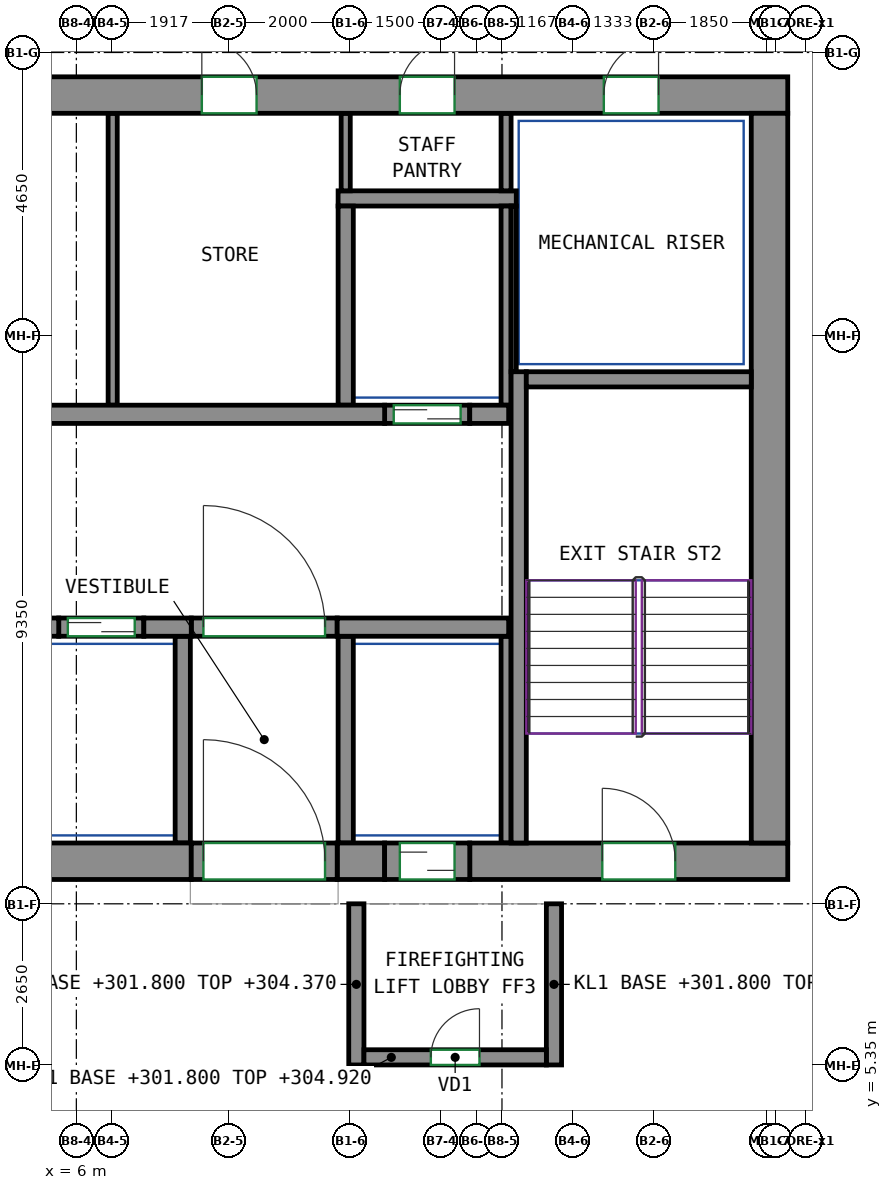
"""IFC4 building model, lengths in metres.
Left out: names, types, materials, properties, quantities, classifications, styles, units other than length and angle.
Written with IfcOpenShell. Run it as: python <this file> out.ifc"""

import sys

from ifc_helpers import new_model, si_unit, direction, frame, frame_2d, origin, place, context, subcontext, project, spatial, rectangle, extrude, source, transform, mapped, element, fill, save


model = new_model("IFC4")
c1 = context("Model", 3, precision=1e-05, world=origin(), true_north=direction((0.0, 1.0)))
c2 = subcontext(c1, "Body", "Model", "MODEL_VIEW")
j1 = project(units=[si_unit("LENGTHUNIT", "METRE"), si_unit("PLANEANGLEUNIT", "RADIAN")], contexts=[c1])
p1 = place(None, origin())
s1 = spatial("IfcSite", under=j1, at=p1, CompositionType="ELEMENT")
p2 = place(p1, origin())
s2 = spatial("IfcBuilding", under=s1, at=p2, CompositionType="ELEMENT")
p3 = place(p2, frame((0.0, 0.0, 301.8)))
s3 = spatial("IfcBuildingStorey", under=s2, at=p3, CompositionType="ELEMENT", Elevation=301.8)
m1 = source(origin(), c2, "Body", "SweptSolid", [
    extrude(rectangle(XDim=14.18, YDim=0.6, at=frame_2d((7.09, 0.0))), origin(), (0.0, 0.0, 1.0), 3.12),
])
p4 = place(p3, frame((-6.29, 8.7, 0.0), z_axis=(0.0, 0.0, 1.0), x_axis=(1.0, 0.0, 0.0)))
e1 = element("IfcWall", 1, at=p4, inside=s3, PredefinedType="SHEAR", context=c2, shape_type="MappedRepresentation", body=[
    mapped(m1, transform((0.0, 0.0, 0.0))),
])
m2 = source(origin(), c2, "Body", "SweptSolid", [
    extrude(rectangle(XDim=0.78, YDim=0.6, at=frame_2d((0.39, 0.0))), origin(), (0.0, 0.0, 1.0), 3.12),
])
p5 = place(p3, frame((10.29, 8.7, 0.0), z_axis=(0.0, 0.0, 1.0), x_axis=(1.0, 0.0, 0.0)))
e2 = element("IfcWall", 2, at=p5, inside=s3, PredefinedType="SHEAR", context=c2, shape_type="MappedRepresentation", body=[
    mapped(m2, transform((0.0, 0.0, 0.0))),
])
m3 = source(origin(), c2, "Body", "SweptSolid", [
    extrude(rectangle(XDim=5.23, YDim=0.6, at=frame_2d((2.615, 0.0))), origin(), (0.0, 0.0, 1.0), 3.12),
])
p6 = place(p3, frame((12.47, 8.7, 0.0), z_axis=(0.0, 0.0, 1.0), x_axis=(1.0, 0.0, 0.0)))
e3 = element("IfcWall", 3, at=p6, inside=s3, PredefinedType="SHEAR", context=c2, shape_type="MappedRepresentation", body=[
    mapped(m3, transform((0.0, 0.0, 0.0))),
])
p7 = place(p6, frame((2.18, 0.0, 0.0)))
e4 = element("IfcOpeningElement", 4, at=p7, cuts=e3, PredefinedType="OPENING", context=c2, shape_type="SweptSolid", body=[
    extrude(rectangle(XDim=1.2, YDim=2.1, at=frame_2d((0.6, 1.05))), frame((0.0, 0.31, 0.0), z_axis=(0.0, -1.0, 0.0), x_axis=(1.0, 0.0, 0.0)), (0.0, 0.0, 1.0), 0.62),
])
m4 = source(origin(), c2, "Body", "SweptSolid", [
    extrude(rectangle(XDim=33.3, YDim=0.6, at=frame_2d((16.65, 0.0))), origin(), (0.0, 0.0, 1.0), 3.12),
])
p8 = place(p3, frame((-15.6, 21.3, 0.0), z_axis=(0.0, 0.0, 1.0), x_axis=(1.0, 0.0, 0.0)))
e5 = element("IfcWall", 5, at=p8, inside=s3, PredefinedType="SHEAR", context=c2, shape_type="MappedRepresentation", body=[
    mapped(m4, transform((0.0, 0.0, 0.0))),
])
p9 = place(p8, frame((8.12, 0.0, 0.0)))
e6 = element("IfcOpeningElement", 6, at=p9, cuts=e5, PredefinedType="OPENING", context=c2, shape_type="SweptSolid", body=[
    extrude(rectangle(XDim=0.9, YDim=2.1, at=frame_2d((0.45, 1.05))), frame((0.0, 0.31, 0.0), z_axis=(0.0, -1.0, 0.0), x_axis=(1.0, 0.0, 0.0)), (0.0, 0.0, 1.0), 0.62),
])
p10 = place(p8, frame((14.15, 0.0, 0.0)))
e7 = element("IfcOpeningElement", 7, at=p10, cuts=e5, PredefinedType="OPENING", context=c2, shape_type="SweptSolid", body=[
    extrude(rectangle(XDim=0.9, YDim=2.1, at=frame_2d((0.45, 1.05))), frame((0.0, 0.31, 0.0), z_axis=(0.0, -1.0, 0.0), x_axis=(1.0, 0.0, 0.0)), (0.0, 0.0, 1.0), 0.62),
])
p11 = place(p8, frame((18.974, 0.0, 0.0)))
e8 = element("IfcOpeningElement", 8, at=p11, cuts=e5, PredefinedType="OPENING", context=c2, shape_type="SweptSolid", body=[
    extrude(rectangle(XDim=0.9, YDim=2.1, at=frame_2d((0.45, 1.05))), frame((0.0, 0.31, 0.0), z_axis=(0.0, -1.0, 0.0), x_axis=(1.0, 0.0, 0.0)), (0.0, 0.0, 1.0), 0.62),
])
p12 = place(p8, frame((23.664, 0.0, 0.0)))
e9 = element("IfcOpeningElement", 9, at=p12, cuts=e5, PredefinedType="OPENING", context=c2, shape_type="SweptSolid", body=[
    extrude(rectangle(XDim=0.9, YDim=2.1, at=frame_2d((0.45, 1.05))), frame((0.0, 0.31, 0.0), z_axis=(0.0, -1.0, 0.0), x_axis=(1.0, 0.0, 0.0)), (0.0, 0.0, 1.0), 0.62),
])
p13 = place(p8, frame((26.92, 0.0, 0.0)))
e10 = element("IfcOpeningElement", 10, at=p13, cuts=e5, PredefinedType="OPENING", context=c2, shape_type="SweptSolid", body=[
    extrude(rectangle(XDim=0.9, YDim=2.1, at=frame_2d((0.45, 1.05))), frame((0.0, 0.31, 0.0), z_axis=(0.0, -1.0, 0.0), x_axis=(1.0, 0.0, 0.0)), (0.0, 0.0, 1.0), 0.62),
])
p14 = place(p8, frame((2.125, 0.0, 0.0)))
e11 = element("IfcOpeningElement", 11, at=p14, cuts=e5, PredefinedType="OPENING", context=c2, shape_type="SweptSolid", body=[
    extrude(rectangle(XDim=0.9, YDim=2.1, at=frame_2d((0.45, 1.05))), frame((0.0, 0.31, 0.0), z_axis=(0.0, -1.0, 0.0), x_axis=(1.0, 0.0, 0.0)), (0.0, 0.0, 1.0), 0.62),
])
p15 = place(p8, frame((30.275, 0.0, 0.0)))
e12 = element("IfcOpeningElement", 12, at=p15, cuts=e5, PredefinedType="OPENING", context=c2, shape_type="SweptSolid", body=[
    extrude(rectangle(XDim=0.9, YDim=2.1, at=frame_2d((0.45, 1.05))), frame((0.0, 0.31, 0.0), z_axis=(0.0, -1.0, 0.0), x_axis=(1.0, 0.0, 0.0)), (0.0, 0.0, 1.0), 0.62),
])
m5 = source(origin(), c2, "Body", "SweptSolid", [
    extrude(rectangle(XDim=12.0, YDim=0.6, at=frame_2d((6.0, 0.0))), origin(), (0.0, 0.0, 1.0), 3.12),
])
p16 = place(p3, frame((17.4, 9.0, 0.0), z_axis=(0.0, 0.0, 1.0), x_axis=(0.0, 1.0, 0.0)))
e13 = element("IfcWall", 13, at=p16, inside=s3, PredefinedType="SHEAR", context=c2, shape_type="MappedRepresentation", body=[
    mapped(m5, transform((0.0, 0.0, 0.0))),
])
m6 = source(origin(), c2, "Body", "SweptSolid", [
    extrude(rectangle(XDim=7.75, YDim=0.25, at=frame_2d((3.875, 0.0))), origin(), (0.0, 0.0, 1.0), 3.12),
])
p17 = place(p3, frame((13.275, 9.0, 0.0), z_axis=(0.0, 0.0, 1.0), x_axis=(0.0, 1.0, 0.0)))
e14 = element("IfcWall", 14, at=p17, inside=s3, PredefinedType="SHEAR", context=c2, shape_type="MappedRepresentation", body=[
    mapped(m6, transform((0.0, 0.0, 0.0))),
])
m7 = source(origin(), c2, "Body", "SweptSolid", [
    extrude(rectangle(XDim=3.7, YDim=0.25, at=frame_2d((1.85, 0.0))), origin(), (0.0, 0.0, 1.0), 3.12),
])
p18 = place(p3, frame((13.4, 16.625, 0.0), z_axis=(0.0, 0.0, 1.0), x_axis=(1.0, 0.0, 0.0)))
e15 = element("IfcWall", 15, at=p18, inside=s3, PredefinedType="SHEAR", context=c2, shape_type="MappedRepresentation", body=[
    mapped(m7, transform((0.0, 0.0, 0.0))),
])
m8 = source(origin(), c2, "Body", "SweptSolid", [
    extrude(rectangle(XDim=1.28, YDim=0.3, at=frame_2d((0.64, 0.0))), origin(), (0.0, 0.0, 1.0), 3.12),
])
p19 = place(p3, frame((4.43, 12.55, 0.0), z_axis=(0.0, 0.0, 1.0), x_axis=(1.0, 0.0, 0.0)))
e16 = element("IfcWall", 16, at=p19, inside=s3, PredefinedType="SHEAR", context=c2, shape_type="MappedRepresentation", body=[
    mapped(m8, transform((0.0, 0.0, 0.0))),
])
m9 = source(origin(), c2, "Body", "SweptSolid", [
    extrude(rectangle(XDim=0.78, YDim=0.3, at=frame_2d((0.39, 0.0))), origin(), (0.0, 0.0, 1.0), 3.12),
])
p20 = place(p3, frame((7.11, 12.55, 0.0), z_axis=(0.0, 0.0, 1.0), x_axis=(1.0, 0.0, 0.0)))
e17 = element("IfcWall", 17, at=p20, inside=s3, PredefinedType="SHEAR", context=c2, shape_type="MappedRepresentation", body=[
    mapped(m9, transform((0.0, 0.0, 0.0))),
])
m10 = source(origin(), c2, "Body", "SweptSolid", [
    extrude(rectangle(XDim=2.82, YDim=0.3, at=frame_2d((1.41, 0.0))), origin(), (0.0, 0.0, 1.0), 3.12),
])
p21 = place(p3, frame((10.29, 12.55, 0.0), z_axis=(0.0, 0.0, 1.0), x_axis=(1.0, 0.0, 0.0)))
e18 = element("IfcWall", 18, at=p21, inside=s3, PredefinedType="SHEAR", context=c2, shape_type="MappedRepresentation", body=[
    mapped(m10, transform((0.0, 0.0, 0.0))),
])
m11 = source(origin(), c2, "Body", "SweptSolid", [
    extrude(rectangle(XDim=22.08, YDim=0.3, at=frame_2d((11.04, 0.0))), origin(), (0.0, 0.0, 1.0), 3.12),
])
p22 = place(p3, frame((-11.01, 16.05, 0.0), z_axis=(0.0, 0.0, 1.0), x_axis=(1.0, 0.0, 0.0)))
e19 = element("IfcWall", 19, at=p22, inside=s3, PredefinedType="SHEAR", context=c2, shape_type="MappedRepresentation", body=[
    mapped(m11, transform((0.0, 0.0, 0.0))),
])
m12 = source(origin(), c2, "Body", "SweptSolid", [
    extrude(rectangle(XDim=0.64, YDim=0.3, at=frame_2d((0.32, 0.0))), origin(), (0.0, 0.0, 1.0), 3.12),
])
p23 = place(p3, frame((12.47, 16.05, 0.0), z_axis=(0.0, 0.0, 1.0), x_axis=(1.0, 0.0, 0.0)))
e20 = element("IfcWall", 20, at=p23, inside=s3, PredefinedType="SHEAR", context=c2, shape_type="MappedRepresentation", body=[
    mapped(m12, transform((0.0, 0.0, 0.0))),
])
m13 = source(origin(), c2, "Body", "SweptSolid", [
    extrude(rectangle(XDim=1.4, YDim=0.3, at=frame_2d((0.7, 0.0))), origin(), (0.0, 0.0, 1.0), 3.12),
])
p24 = place(p3, frame((5.71, 12.55, 0.0), z_axis=(0.0, 0.0, 1.0), x_axis=(1.0, 0.0, 0.0)))
e21 = element("IfcWall", 21, at=p24, inside=s3, PredefinedType="PARTITIONING", context=c2, shape_type="MappedRepresentation", body=[
    mapped(m13, transform((0.0, 0.0, 0.0))),
])
p25 = place(p24, frame((0.15, 0.0, 0.0)))
e22 = element("IfcOpeningElement", 22, at=p25, cuts=e21, PredefinedType="OPENING", context=c2, shape_type="SweptSolid", body=[
    extrude(rectangle(XDim=1.1, YDim=2.1, at=frame_2d((0.55, 1.05))), frame((0.0, 0.16, 0.0), z_axis=(0.0, -1.0, 0.0), x_axis=(1.0, 0.0, 0.0)), (0.0, 0.0, 1.0), 0.32),
])
m14 = source(origin(), c2, "Body", "SweptSolid", [
    extrude(rectangle(XDim=1.4, YDim=0.3, at=frame_2d((0.7, 0.0))), origin(), (0.0, 0.0, 1.0), 3.12),
])
p26 = place(p3, frame((11.07, 16.05, 0.0), z_axis=(0.0, 0.0, 1.0), x_axis=(1.0, 0.0, 0.0)))
e23 = element("IfcWall", 23, at=p26, inside=s3, PredefinedType="PARTITIONING", context=c2, shape_type="MappedRepresentation", body=[
    mapped(m14, transform((0.0, 0.0, 0.0))),
])
p27 = place(p26, frame((0.15, 0.0, 0.0)))
e24 = element("IfcOpeningElement", 24, at=p27, cuts=e23, PredefinedType="OPENING", context=c2, shape_type="SweptSolid", body=[
    extrude(rectangle(XDim=1.1, YDim=2.1, at=frame_2d((0.55, 1.05))), frame((0.0, 0.16, 0.0), z_axis=(0.0, -1.0, 0.0), x_axis=(1.0, 0.0, 0.0)), (0.0, 0.0, 1.0), 0.32),
])
m15 = source(origin(), c2, "Body", "SweptSolid", [
    extrude(rectangle(XDim=2.4, YDim=0.3, at=frame_2d((1.2, 0.0))), origin(), (0.0, 0.0, 1.0), 3.12),
])
p28 = place(p3, frame((7.89, 12.55, 0.0), z_axis=(0.0, 0.0, 1.0), x_axis=(1.0, 0.0, 0.0)))
e25 = element("IfcWall", 25, at=p28, inside=s3, PredefinedType="PARTITIONING", context=c2, shape_type="MappedRepresentation", body=[
    mapped(m15, transform((0.0, 0.0, 0.0))),
])
p29 = place(p28, frame((0.2, 0.0, 0.0)))
e26 = element("IfcOpeningElement", 26, at=p29, cuts=e25, PredefinedType="OPENING", context=c2, shape_type="SweptSolid", body=[
    extrude(rectangle(XDim=2.0, YDim=2.1, at=frame_2d((1.0, 1.05))), frame((0.0, 0.16, 0.0), z_axis=(0.0, -1.0, 0.0), x_axis=(1.0, 0.0, 0.0)), (0.0, 0.0, 1.0), 0.32),
])
m16 = source(origin(), c2, "Body", "SweptSolid", [
    extrude(rectangle(XDim=2.65, YDim=0.25, at=frame_2d((1.325, 0.0))), origin(), (0.0, 0.0, 1.0), 2.57),
])
for number, where, z_axis, x_axis in (
    (27, (10.605, 5.35, 0.0), (0.0, 0.0, 1.0), (0.0, 1.0, 0.0)),
    (28, (13.855, 5.35, 0.0), (0.0, 0.0, 1.0), (0.0, 1.0, 0.0)),
):
    element("IfcWall", number, at=place(p3, frame(where, z_axis=z_axis, x_axis=x_axis)), inside=s3, PredefinedType="PARTITIONING", context=c2, shape_type="MappedRepresentation", body=[
        mapped(m16, transform((0.0, 0.0, 0.0))),
    ])
m17 = source(origin(), c2, "Body", "SweptSolid", [
    extrude(rectangle(XDim=3.0, YDim=0.25, at=frame_2d((1.5, 0.0))), origin(), (0.0, 0.0, 1.0), 3.12),
])
p30 = place(p3, frame((10.73, 5.475, 0.0), z_axis=(0.0, 0.0, 1.0), x_axis=(1.0, 0.0, 0.0)))
e29 = element("IfcWall", 29, at=p30, inside=s3, PredefinedType="PARTITIONING", context=c2, shape_type="MappedRepresentation", body=[
    mapped(m17, transform((0.0, 0.0, 0.0))),
])
p31 = place(p30, frame((1.1, 0.0, 0.0)))
e30 = element("IfcOpeningElement", 30, at=p31, cuts=e29, PredefinedType="OPENING", context=c2, shape_type="SweptSolid", body=[
    extrude(rectangle(XDim=0.8, YDim=2.0, at=frame_2d((0.4, 1.0))), frame((0.0, 0.135, 0.0), z_axis=(0.0, -1.0, 0.0), x_axis=(1.0, 0.0, 0.0)), (0.0, 0.0, 1.0), 0.27),
])
m18 = source(origin(), c2, "Body", "SweptSolid", [
    extrude(rectangle(XDim=2.93, YDim=0.25, at=frame_2d((1.465, 0.0))), origin(), (0.0, 0.0, 1.0), 3.12),
])
p32 = place(p3, frame((10.305, 19.6, 0.0), z_axis=(0.0, 0.0, 1.0), x_axis=(1.0, 0.0, 0.0)))
e31 = element("IfcWall", 31, at=p32, inside=s3, PredefinedType="PARTITIONING", context=c2, shape_type="MappedRepresentation", body=[
    mapped(m18, transform((0.0, 0.0, 0.0))),
])
m19 = source(origin(), c2, "Body", "SweptSolid", [
    extrude(rectangle(XDim=3.275, YDim=0.165, at=frame_2d((1.638, 0.0))), origin(), (0.0, 0.0, 1.0), 3.12),
])
p33 = place(p3, frame((13.067, 16.2, 0.0), z_axis=(0.0, 0.0, 1.0), x_axis=(0.0, 1.0, 0.0)))
e32 = element("IfcWall", 32, at=p33, inside=s3, PredefinedType="PARTITIONING", context=c2, shape_type="MappedRepresentation", body=[
    mapped(m19, transform((0.0, 0.0, 0.0))),
])
m20 = source(origin(), c2, "Body", "SweptSolid", [
    extrude(rectangle(XDim=1.275, YDim=0.165, at=frame_2d((0.637, 0.0))), origin(), (0.0, 0.0, 1.0), 3.12),
])
p34 = place(p3, frame((13.067, 19.725, 0.0), z_axis=(0.0, 0.0, 1.0), x_axis=(0.0, 1.0, 0.0)))
e33 = element("IfcWall", 33, at=p34, inside=s3, PredefinedType="PARTITIONING", context=c2, shape_type="MappedRepresentation", body=[
    mapped(m20, transform((0.0, 0.0, 0.0))),
])
m21 = source(origin(), c2, "Body", "SweptSolid", [
    extrude(rectangle(XDim=3.275, YDim=0.25, at=frame_2d((1.638, 0.0))), origin(), (0.0, 0.0, 1.0), 3.12),
])
p35 = place(p3, frame((10.43, 16.2, 0.0), z_axis=(0.0, 0.0, 1.0), x_axis=(0.0, 1.0, 0.0)))
e34 = element("IfcWall", 34, at=p35, inside=s3, PredefinedType="PARTITIONING", context=c2, shape_type="MappedRepresentation", body=[
    mapped(m21, transform((0.0, 0.0, 0.0))),
])
m22 = source(origin(), c2, "Body", "SweptSolid", [
    extrude(rectangle(XDim=2.725, YDim=0.085, at=frame_2d((1.363, 0.0))), origin(), (0.0, 0.0, 1.0), 3.12),
])
p36 = place(p3, frame((13.192, 16.75, 0.0), z_axis=(0.0, 0.0, 1.0), x_axis=(0.0, 1.0, 0.0)))
e35 = element("IfcWall", 35, at=p36, inside=s3, PredefinedType="PARTITIONING", context=c2, shape_type="MappedRepresentation", body=[
    mapped(m22, transform((0.0, 0.0, 0.0))),
])
m23 = source(origin(), c2, "Body", "SweptSolid", [
    extrude(rectangle(XDim=3.4, YDim=0.25, at=frame_2d((1.7, 0.0))), origin(), (0.0, 0.0, 1.0), 3.12),
])
p37 = place(p3, frame((10.43, 9.0, 0.0), z_axis=(0.0, 0.0, 1.0), x_axis=(0.0, 1.0, 0.0)))
e36 = element("IfcWall", 36, at=p37, inside=s3, PredefinedType="PARTITIONING", context=c2, shape_type="MappedRepresentation", body=[
    mapped(m23, transform((0.0, 0.0, 0.0))),
])
m24 = source(origin(), c2, "Body", "SweptSolid", [
    extrude(rectangle(XDim=3.4, YDim=0.165, at=frame_2d((1.7, 0.0))), origin(), (0.0, 0.0, 1.0), 3.12),
])
p38 = place(p3, frame((13.067, 9.0, 0.0), z_axis=(0.0, 0.0, 1.0), x_axis=(0.0, 1.0, 0.0)))
e37 = element("IfcWall", 37, at=p38, inside=s3, PredefinedType="PARTITIONING", context=c2, shape_type="MappedRepresentation", body=[
    mapped(m24, transform((0.0, 0.0, 0.0))),
])
p39 = place(p3, frame((7.75, 9.0, 0.0), z_axis=(0.0, 0.0, 1.0), x_axis=(0.0, 1.0, 0.0)))
e38 = element("IfcWall", 38, at=p39, inside=s3, PredefinedType="PARTITIONING", context=c2, shape_type="MappedRepresentation", body=[
    mapped(m23, transform((0.0, 0.0, 0.0))),
])
m25 = source(origin(), c2, "Body", "SweptSolid", [
    extrude(rectangle(XDim=4.8, YDim=0.15, at=frame_2d((2.4, 0.0))), origin(), (0.0, 0.0, 1.0), 3.12),
])
p40 = place(p3, frame((6.598, 16.2, 0.0), z_axis=(0.0, 0.0, 1.0), x_axis=(0.0, 1.0, 0.0)))
e39 = element("IfcWall", 39, at=p40, inside=s3, PredefinedType="PARTITIONING", context=c2, shape_type="MappedRepresentation", body=[
    mapped(m25, transform((0.0, 0.0, 0.0))),
])
m26 = source(origin(), c2, "Body", "SweptSolid", [
    extrude(rectangle(XDim=1.275, YDim=0.15, at=frame_2d((0.637, 0.0))), origin(), (0.0, 0.0, 1.0), 3.12),
])
p41 = place(p3, frame((10.43, 19.725, 0.0), z_axis=(0.0, 0.0, 1.0), x_axis=(0.0, 1.0, 0.0)))
e40 = element("IfcWall", 40, at=p41, inside=s3, PredefinedType="PARTITIONING", context=c2, shape_type="MappedRepresentation", body=[
    mapped(m26, transform((0.0, 0.0, 0.0))),
])
m27 = source(origin(), c2, "Body", "SweptSolid", [
    extrude(rectangle(XDim=2.4, YDim=0.6, at=frame_2d((1.2, 0.0))), origin(), (0.0, 0.0, 1.0), 2.7),
])
p42 = place(p3, frame((7.89, 8.7, 0.0), z_axis=(0.0, 0.0, 1.0), x_axis=(1.0, 0.0, 0.0)))
e41 = element("IfcWall", 41, at=p42, inside=s3, PredefinedType="PARTITIONING", context=c2, shape_type="MappedRepresentation", body=[
    mapped(m27, transform((0.0, 0.0, 0.0))),
])
p43 = place(p42, frame((0.2, 0.0, 0.0)))
e42 = element("IfcOpeningElement", 42, at=p43, cuts=e41, PredefinedType="OPENING", context=c2, shape_type="SweptSolid", body=[
    extrude(rectangle(XDim=2.0, YDim=2.1, at=frame_2d((1.0, 1.05))), frame((0.0, 0.31, 0.0), z_axis=(0.0, -1.0, 0.0), x_axis=(1.0, 0.0, 0.0)), (0.0, 0.0, 1.0), 0.62),
])
m28 = source(origin(), c2, "Body", "SweptSolid", [
    extrude(rectangle(XDim=1.4, YDim=0.6, at=frame_2d((0.7, 0.0))), origin(), (0.0, 0.0, 1.0), 2.7),
])
p44 = place(p3, frame((11.07, 8.7, 0.0), z_axis=(0.0, 0.0, 1.0), x_axis=(1.0, 0.0, 0.0)))
e43 = element("IfcWall", 43, at=p44, inside=s3, PredefinedType="PARTITIONING", context=c2, shape_type="MappedRepresentation", body=[
    mapped(m28, transform((0.0, 0.0, 0.0))),
])
p45 = place(p44, frame((0.25, 0.0, 0.0)))
e44 = element("IfcOpeningElement", 44, at=p45, cuts=e43, PredefinedType="OPENING", context=c2, shape_type="SweptSolid", body=[
    extrude(rectangle(XDim=0.9, YDim=2.1, at=frame_2d((0.45, 1.05))), frame((0.0, 0.31, 0.0), z_axis=(0.0, -1.0, 0.0), x_axis=(1.0, 0.0, 0.0)), (0.0, 0.0, 1.0), 0.62),
])
p46 = place(p29, origin())
e45 = element("IfcDoor", 45, at=p46, inside=s3, OperationType="DOUBLE_DOOR_SINGLE_SWING", PredefinedType="DOOR", context=c2, shape_type="SweptSolid", body=[
    extrude(rectangle(XDim=2.0, YDim=2.1, at=frame_2d((1.0, 1.05))), frame((0.0, 0.025, 0.0), z_axis=(0.0, -1.0, 0.0), x_axis=(1.0, 0.0, 0.0)), (0.0, 0.0, 1.0), 0.05),
])
fill(e26, e45)
p47 = place(p43, origin())
e46 = element("IfcDoor", 46, at=p47, inside=s3, OperationType="DOUBLE_DOOR_SINGLE_SWING", PredefinedType="DOOR", context=c2, shape_type="SweptSolid", body=[
    extrude(rectangle(XDim=2.0, YDim=2.1, at=frame_2d((1.0, 1.05))), frame((0.0, 0.205, 0.0), z_axis=(0.0, -1.0, 0.0), x_axis=(1.0, 0.0, 0.0)), (0.0, 0.0, 1.0), 0.05),
])
fill(e42, e46)
p48 = place(p31, origin())
e47 = element("IfcDoor", 47, at=p48, inside=s3, OperationType="SINGLE_SWING_RIGHT", PredefinedType="DOOR", context=c2, shape_type="SweptSolid", body=[
    extrude(rectangle(XDim=0.8, YDim=2.0, at=frame_2d((0.4, 1.0))), frame((0.0, 0.025, 0.0), z_axis=(0.0, -1.0, 0.0), x_axis=(1.0, 0.0, 0.0)), (0.0, 0.0, 1.0), 0.05),
])
fill(e30, e47)
p49 = place(p45, origin())
e48 = element("IfcDoor", 48, at=p49, inside=s3, OperationType="SLIDING_TO_LEFT", PredefinedType="DOOR", context=c2, shape_type="SweptSolid", body=[
    extrude(rectangle(XDim=0.9, YDim=2.1, at=frame_2d((0.45, 1.05))), frame((0.0, 0.205, 0.0), z_axis=(0.0, -1.0, 0.0), x_axis=(1.0, 0.0, 0.0)), (0.0, 0.0, 1.0), 0.05),
])
fill(e44, e48)
p50 = place(p25, origin())
e49 = element("IfcDoor", 49, at=p50, inside=s3, OperationType="DOUBLE_DOOR_SLIDING", PredefinedType="DOOR", context=c2, shape_type="SweptSolid", body=[
    extrude(rectangle(XDim=1.1, YDim=2.1, at=frame_2d((0.55, 1.05))), frame((0.0, 0.025, 0.0), z_axis=(0.0, -1.0, 0.0), x_axis=(1.0, 0.0, 0.0)), (0.0, 0.0, 1.0), 0.05),
])
fill(e22, e49)
p51 = place(p27, origin())
e50 = element("IfcDoor", 50, at=p51, inside=s3, OperationType="DOUBLE_DOOR_SLIDING", PredefinedType="DOOR", context=c2, shape_type="SweptSolid", body=[
    extrude(rectangle(XDim=1.1, YDim=2.1, at=frame_2d((0.55, 1.05))), frame((0.0, 0.025, 0.0), z_axis=(0.0, -1.0, 0.0), x_axis=(1.0, 0.0, 0.0)), (0.0, 0.0, 1.0), 0.05),
])
fill(e24, e50)
p52 = place(p12, origin())
e51 = element("IfcDoor", 51, at=p52, inside=s3, OperationType="SINGLE_SWING_LEFT", PredefinedType="DOOR", context=c2, shape_type="SweptSolid", body=[
    extrude(rectangle(XDim=0.9, YDim=2.1, at=frame_2d((0.45, 1.05))), frame((0.0, -0.155, 0.0), z_axis=(0.0, -1.0, 0.0), x_axis=(1.0, 0.0, 0.0)), (0.0, 0.0, 1.0), 0.05),
])
fill(e9, e51)
p53 = place(p13, origin())
e52 = element("IfcDoor", 52, at=p53, inside=s3, OperationType="SINGLE_SWING_RIGHT", PredefinedType="DOOR", context=c2, shape_type="SweptSolid", body=[
    extrude(rectangle(XDim=0.9, YDim=2.1, at=frame_2d((0.45, 1.05))), frame((0.0, -0.155, 0.0), z_axis=(0.0, -1.0, 0.0), x_axis=(1.0, 0.0, 0.0)), (0.0, 0.0, 1.0), 0.05),
])
fill(e10, e52)
p54 = place(p15, origin())
e53 = element("IfcDoor", 53, at=p54, inside=s3, OperationType="SINGLE_SWING_RIGHT", PredefinedType="DOOR", context=c2, shape_type="SweptSolid", body=[
    extrude(rectangle(XDim=0.9, YDim=2.1, at=frame_2d((0.45, 1.05))), frame((0.0, -0.155, 0.0), z_axis=(0.0, -1.0, 0.0), x_axis=(1.0, 0.0, 0.0)), (0.0, 0.0, 1.0), 0.05),
])
fill(e12, e53)
p55 = place(p7, origin())
e54 = element("IfcDoor", 54, at=p55, inside=s3, OperationType="DOUBLE_DOOR_SINGLE_SWING", PredefinedType="DOOR", context=c2, shape_type="SweptSolid", body=[
    extrude(rectangle(XDim=1.2, YDim=2.1, at=frame_2d((0.6, 1.05))), frame((0.0, 0.205, 0.0), z_axis=(0.0, -1.0, 0.0), x_axis=(1.0, 0.0, 0.0)), (0.0, 0.0, 1.0), 0.05),
])
fill(e4, e54)
save(model, sys.argv[1])
